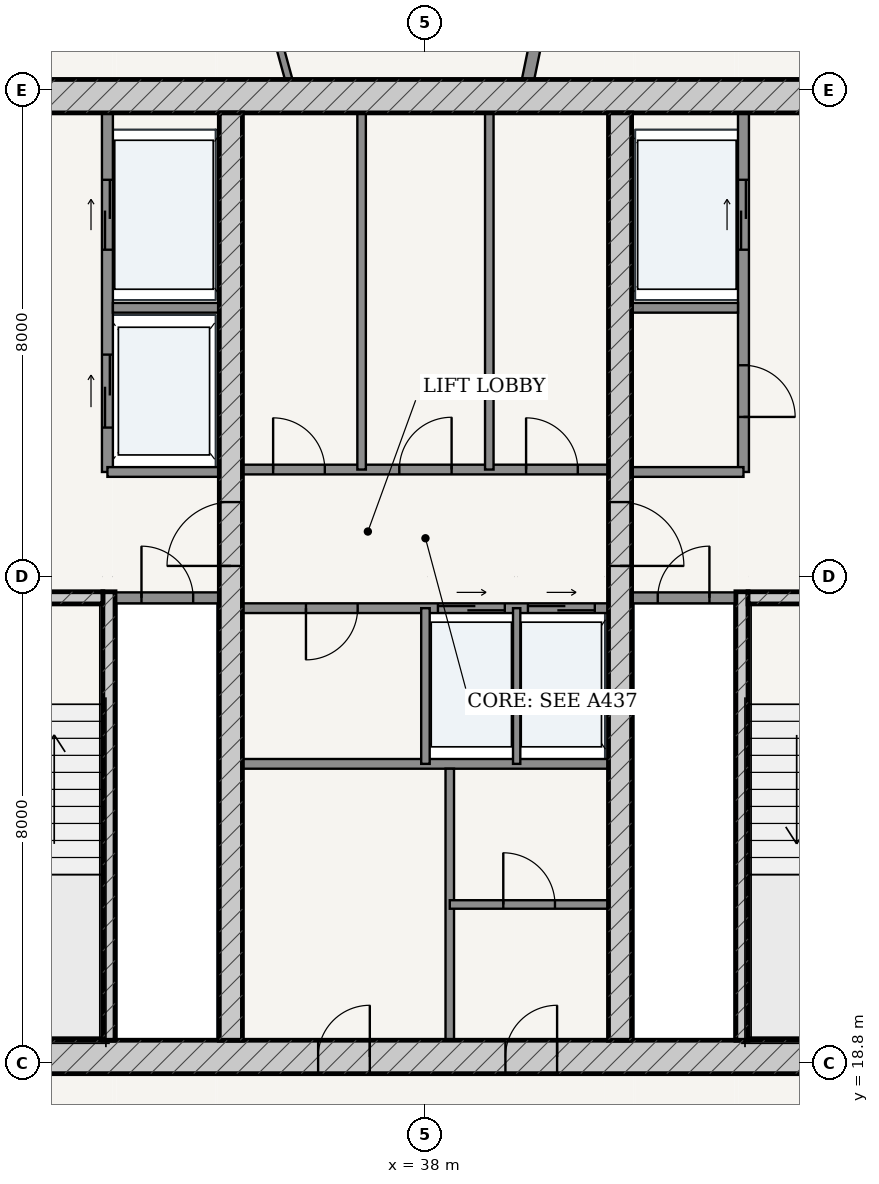
"""IFC4 building model, lengths in metres.
Left out: names, types, materials, properties, quantities, classifications, styles, units other than length and angle.
Written with IfcOpenShell. Run it as: python <this file> out.ifc"""

import sys

from ifc_helpers import new_model, si_unit, direction, frame, frame_2d, origin, place, context, subcontext, project, spatial, rectangle, extrude, source, transform, mapped, element, fill, save


model = new_model("IFC4")
c1 = context("Model", 3, precision=1e-05, world=origin(), true_north=direction((-0.2419218956, 0.970295726276)))
c2 = subcontext(c1, "Body", "Model", "MODEL_VIEW")
j1 = project(units=[si_unit("LENGTHUNIT", "METRE"), si_unit("PLANEANGLEUNIT", "RADIAN")], contexts=[c1])
p1 = place(None, origin())
s1 = spatial("IfcSite", under=j1, at=p1, CompositionType="ELEMENT")
p2 = place(p1, origin())
s2 = spatial("IfcBuilding", under=s1, at=p2, CompositionType="ELEMENT")
p3 = place(p2, frame((0.0, 0.0, 281.95)))
s3 = spatial("IfcBuildingStorey", under=s2, at=p3, CompositionType="ELEMENT", Elevation=281.95)
p4 = place(p3, frame((28.825, 18.9, 0.0), z_axis=(0.0, 0.0, 1.0), x_axis=(1.0, 0.0, 0.0)))
e1 = element("IfcWall", 1, at=p4, inside=s3, PredefinedType="SHEAR", context=c2, shape_type="SweptSolid", body=[
    extrude(rectangle(XDim=18.35, YDim=0.55, at=frame_2d((9.175, 0.0))), origin(), (0.0, 0.0, 1.0), 3.49),
])
p5 = place(p4, frame((7.41, 0.0, 0.0)))
e2 = element("IfcOpeningElement", 2, at=p5, cuts=e1, PredefinedType="OPENING", context=c2, shape_type="SweptSolid", body=[
    extrude(rectangle(XDim=0.85, YDim=2.1, at=frame_2d((0.425, 1.05))), frame((0.0, 0.285, 0.0), z_axis=(0.0, -1.0, 0.0), x_axis=(1.0, 0.0, 0.0)), (0.0, 0.0, 1.0), 0.57),
])
p6 = place(p4, frame((10.49, 0.0, 0.0)))
e3 = element("IfcOpeningElement", 3, at=p6, cuts=e1, PredefinedType="OPENING", context=c2, shape_type="SweptSolid", body=[
    extrude(rectangle(XDim=0.85, YDim=2.1, at=frame_2d((0.425, 1.05))), frame((0.0, 0.285, 0.0), z_axis=(0.0, -1.0, 0.0), x_axis=(1.0, 0.0, 0.0)), (0.0, 0.0, 1.0), 0.57),
])
p7 = place(p3, frame((28.825, 34.7, 0.0), z_axis=(0.0, 0.0, 1.0), x_axis=(1.0, 0.0, 0.0)))
e4 = element("IfcWall", 4, at=p7, inside=s3, PredefinedType="SHEAR", context=c2, shape_type="SweptSolid", body=[
    extrude(rectangle(XDim=18.35, YDim=0.55, at=frame_2d((9.175, 0.0))), origin(), (0.0, 0.0, 1.0), 3.49),
])
p8 = place(p3, frame((32.795, 19.175, 0.0), z_axis=(0.0, 0.0, 1.0), x_axis=(0.0, 1.0, 0.0)))
e5 = element("IfcWall", 5, at=p8, inside=s3, PredefinedType="SOLIDWALL", context=c2, shape_type="SweptSolid", body=[
    extrude(rectangle(XDim=7.375, YDim=0.2, at=frame_2d((3.688, 0.0))), origin(), (0.0, 0.0, 1.0), 3.49),
])
p9 = place(p3, frame((29.375, 26.45, 0.0), z_axis=(0.0, 0.0, 1.0), x_axis=(1.0, 0.0, 0.0)))
e6 = element("IfcWall", 6, at=p9, inside=s3, PredefinedType="SOLIDWALL", context=c2, shape_type="SweptSolid", body=[
    extrude(rectangle(XDim=3.32, YDim=0.2, at=frame_2d((1.66, 0.0))), origin(), (0.0, 0.0, 1.0), 3.49),
])
p10 = place(p9, frame((1.185, 0.0, 0.0)))
e7 = element("IfcOpeningElement", 7, at=p10, cuts=e6, PredefinedType="OPENING", context=c2, shape_type="SweptSolid", body=[
    extrude(rectangle(XDim=0.95, YDim=2.15, at=frame_2d((0.475, 1.075))), frame((0.0, 0.11, 0.0), z_axis=(0.0, -1.0, 0.0), x_axis=(1.0, 0.0, 0.0)), (0.0, 0.0, 1.0), 0.22),
])
p11 = place(p3, frame((43.205, 19.175, 0.0), z_axis=(0.0, 0.0, 1.0), x_axis=(0.0, 1.0, 0.0)))
e8 = element("IfcWall", 8, at=p11, inside=s3, PredefinedType="SOLIDWALL", context=c2, shape_type="SweptSolid", body=[
    extrude(rectangle(XDim=7.375, YDim=0.2, at=frame_2d((3.688, 0.0))), origin(), (0.0, 0.0, 1.0), 3.49),
])
p12 = place(p3, frame((43.305, 26.45, 0.0), z_axis=(0.0, 0.0, 1.0), x_axis=(1.0, 0.0, 0.0)))
e9 = element("IfcWall", 9, at=p12, inside=s3, PredefinedType="SOLIDWALL", context=c2, shape_type="SweptSolid", body=[
    extrude(rectangle(XDim=3.32, YDim=0.2, at=frame_2d((1.66, 0.0))), origin(), (0.0, 0.0, 1.0), 3.49),
])
p13 = place(p12, frame((1.185, 0.0, 0.0)))
e10 = element("IfcOpeningElement", 10, at=p13, cuts=e9, PredefinedType="OPENING", context=c2, shape_type="SweptSolid", body=[
    extrude(rectangle(XDim=0.95, YDim=2.15, at=frame_2d((0.475, 1.075))), frame((0.0, 0.11, 0.0), z_axis=(0.0, -1.0, 0.0), x_axis=(1.0, 0.0, 0.0)), (0.0, 0.0, 1.0), 0.22),
])
p14 = place(p3, frame((34.8, 19.175, 0.0), z_axis=(0.0, 0.0, 1.0), x_axis=(0.0, 1.0, 0.0)))
e11 = element("IfcWall", 11, at=p14, inside=s3, PredefinedType="SHEAR", context=c2, shape_type="SweptSolid", body=[
    extrude(rectangle(XDim=15.25, YDim=0.38, at=frame_2d((7.625, 0.0))), origin(), (0.0, 0.0, 1.0), 3.49),
])
p15 = place(p14, frame((7.8, 0.0, 0.0)))
e12 = element("IfcOpeningElement", 12, at=p15, cuts=e11, PredefinedType="OPENING", context=c2, shape_type="SweptSolid", body=[
    extrude(rectangle(XDim=1.05, YDim=2.15, at=frame_2d((0.525, 1.075))), frame((0.0, 0.2, 0.0), z_axis=(0.0, -1.0, 0.0), x_axis=(1.0, 0.0, 0.0)), (0.0, 0.0, 1.0), 0.4),
])
p16 = place(p3, frame((41.2, 19.175, 0.0), z_axis=(0.0, 0.0, 1.0), x_axis=(0.0, 1.0, 0.0)))
e13 = element("IfcWall", 13, at=p16, inside=s3, PredefinedType="SHEAR", context=c2, shape_type="SweptSolid", body=[
    extrude(rectangle(XDim=15.25, YDim=0.38, at=frame_2d((7.625, 0.0))), origin(), (0.0, 0.0, 1.0), 3.49),
])
p17 = place(p16, frame((7.8, 0.0, 0.0)))
e14 = element("IfcOpeningElement", 14, at=p17, cuts=e13, PredefinedType="OPENING", context=c2, shape_type="SweptSolid", body=[
    extrude(rectangle(XDim=1.05, YDim=2.15, at=frame_2d((0.525, 1.075))), frame((0.0, 0.2, 0.0), z_axis=(0.0, -1.0, 0.0), x_axis=(1.0, 0.0, 0.0)), (0.0, 0.0, 1.0), 0.4),
])
p18 = place(p3, frame((32.9, 26.45, 0.0), z_axis=(0.0, 0.0, 1.0), x_axis=(1.0, 0.0, 0.0)))
e15 = element("IfcWall", 15, at=p18, inside=s3, PredefinedType="PARTITIONING", context=c2, shape_type="SweptSolid", body=[
    extrude(rectangle(XDim=1.71, YDim=0.18, at=frame_2d((0.855, 0.0))), origin(), (0.0, 0.0, 1.0), 3.49),
])
p19 = place(p18, frame((0.43, 0.0, 0.0)))
e16 = element("IfcOpeningElement", 16, at=p19, cuts=e15, PredefinedType="OPENING", context=c2, shape_type="SweptSolid", body=[
    extrude(rectangle(XDim=0.85, YDim=2.1, at=frame_2d((0.425, 1.05))), frame((0.0, 0.1, 0.0), z_axis=(0.0, -1.0, 0.0), x_axis=(1.0, 0.0, 0.0)), (0.0, 0.0, 1.0), 0.2),
])
p20 = place(p3, frame((41.39, 26.45, 0.0), z_axis=(0.0, 0.0, 1.0), x_axis=(1.0, 0.0, 0.0)))
e17 = element("IfcWall", 17, at=p20, inside=s3, PredefinedType="PARTITIONING", context=c2, shape_type="SweptSolid", body=[
    extrude(rectangle(XDim=1.71, YDim=0.18, at=frame_2d((0.855, 0.0))), origin(), (0.0, 0.0, 1.0), 3.49),
])
p21 = place(p20, frame((0.43, 0.0, 0.0)))
e18 = element("IfcOpeningElement", 18, at=p21, cuts=e17, PredefinedType="OPENING", context=c2, shape_type="SweptSolid", body=[
    extrude(rectangle(XDim=0.85, YDim=2.1, at=frame_2d((0.425, 1.05))), frame((0.0, 0.1, 0.0), z_axis=(0.0, -1.0, 0.0), x_axis=(1.0, 0.0, 0.0)), (0.0, 0.0, 1.0), 0.2),
])
p22 = place(p3, frame((32.77, 28.52, 0.0), z_axis=(0.0, 0.0, 1.0), x_axis=(0.0, 1.0, 0.0)))
e19 = element("IfcWall", 19, at=p22, inside=s3, PredefinedType="PARTITIONING", context=c2, shape_type="SweptSolid", body=[
    extrude(rectangle(XDim=5.905, YDim=0.18, at=frame_2d((2.953, 0.0))), origin(), (0.0, 0.0, 1.0), 3.49),
])
p23 = place(p22, frame((3.655, 0.0, 0.0)))
e20 = element("IfcOpeningElement", 20, at=p23, cuts=e19, PredefinedType="OPENING", context=c2, shape_type="SweptSolid", body=[
    extrude(rectangle(XDim=1.15, YDim=2.2, at=frame_2d((0.575, 1.1))), frame((0.0, 0.1, 0.0), z_axis=(0.0, -1.0, 0.0), x_axis=(1.0, 0.0, 0.0)), (0.0, 0.0, 1.0), 0.2),
])
p24 = place(p22, frame((0.73, 0.0, 0.0)))
e21 = element("IfcOpeningElement", 21, at=p24, cuts=e19, PredefinedType="OPENING", context=c2, shape_type="SweptSolid", body=[
    extrude(rectangle(XDim=1.2, YDim=2.25, at=frame_2d((0.6, 1.125))), frame((0.0, 0.1, 0.0), z_axis=(0.0, -1.0, 0.0), x_axis=(1.0, 0.0, 0.0)), (0.0, 0.0, 1.0), 0.2),
])
p25 = place(p3, frame((32.86, 31.22, 0.0), z_axis=(0.0, 0.0, 1.0), x_axis=(1.0, 0.0, 0.0)))
e22 = element("IfcWall", 22, at=p25, inside=s3, PredefinedType="PARTITIONING", context=c2, shape_type="SweptSolid", body=[
    extrude(rectangle(XDim=1.75, YDim=0.16, at=frame_2d((0.875, 0.0))), origin(), (0.0, 0.0, 1.0), 3.49),
])
p26 = place(p3, frame((32.77, 28.52, 0.0), z_axis=(0.0, 0.0, 1.0), x_axis=(1.0, 0.0, 0.0)))
e23 = element("IfcWall", 23, at=p26, inside=s3, PredefinedType="PARTITIONING", context=c2, shape_type="SweptSolid", body=[
    extrude(rectangle(XDim=1.84, YDim=0.16, at=frame_2d((0.92, 0.0))), origin(), (0.0, 0.0, 1.0), 3.49),
])
p27 = place(p3, frame((43.23, 28.52, 0.0), z_axis=(0.0, 0.0, 1.0), x_axis=(0.0, 1.0, 0.0)))
e24 = element("IfcWall", 24, at=p27, inside=s3, PredefinedType="PARTITIONING", context=c2, shape_type="SweptSolid", body=[
    extrude(rectangle(XDim=5.905, YDim=0.18, at=frame_2d((2.953, 0.0))), origin(), (0.0, 0.0, 1.0), 3.49),
])
p28 = place(p27, frame((0.905, 0.0, 0.0)))
e25 = element("IfcOpeningElement", 25, at=p28, cuts=e24, PredefinedType="OPENING", context=c2, shape_type="SweptSolid", body=[
    extrude(rectangle(XDim=0.85, YDim=2.1, at=frame_2d((0.425, 1.05))), frame((0.0, 0.1, 0.0), z_axis=(0.0, -1.0, 0.0), x_axis=(1.0, 0.0, 0.0)), (0.0, 0.0, 1.0), 0.2),
])
p29 = place(p27, frame((3.655, 0.0, 0.0)))
e26 = element("IfcOpeningElement", 26, at=p29, cuts=e24, PredefinedType="OPENING", context=c2, shape_type="SweptSolid", body=[
    extrude(rectangle(XDim=1.15, YDim=2.2, at=frame_2d((0.575, 1.1))), frame((0.0, 0.1, 0.0), z_axis=(0.0, -1.0, 0.0), x_axis=(1.0, 0.0, 0.0)), (0.0, 0.0, 1.0), 0.2),
])
p30 = place(p3, frame((41.39, 31.22, 0.0), z_axis=(0.0, 0.0, 1.0), x_axis=(1.0, 0.0, 0.0)))
e27 = element("IfcWall", 27, at=p30, inside=s3, PredefinedType="PARTITIONING", context=c2, shape_type="SweptSolid", body=[
    extrude(rectangle(XDim=1.75, YDim=0.16, at=frame_2d((0.875, 0.0))), origin(), (0.0, 0.0, 1.0), 3.49),
])
p31 = place(p3, frame((41.39, 28.52, 0.0), z_axis=(0.0, 0.0, 1.0), x_axis=(1.0, 0.0, 0.0)))
e28 = element("IfcWall", 28, at=p31, inside=s3, PredefinedType="PARTITIONING", context=c2, shape_type="SweptSolid", body=[
    extrude(rectangle(XDim=1.84, YDim=0.16, at=frame_2d((0.92, 0.0))), origin(), (0.0, 0.0, 1.0), 3.49),
])
p32 = place(p3, frame((34.99, 28.56, 0.0), z_axis=(0.0, 0.0, 1.0), x_axis=(1.0, 0.0, 0.0)))
e29 = element("IfcWall", 29, at=p32, inside=s3, PredefinedType="PARTITIONING", context=c2, shape_type="SweptSolid", body=[
    extrude(rectangle(XDim=6.02, YDim=0.16, at=frame_2d((3.01, 0.0))), origin(), (0.0, 0.0, 1.0), 3.49),
])
p33 = place(p32, frame((0.505, 0.0, 0.0)))
e30 = element("IfcOpeningElement", 30, at=p33, cuts=e29, PredefinedType="OPENING", context=c2, shape_type="SweptSolid", body=[
    extrude(rectangle(XDim=0.85, YDim=2.1, at=frame_2d((0.425, 1.05))), frame((0.0, 0.09, 0.0), z_axis=(0.0, -1.0, 0.0), x_axis=(1.0, 0.0, 0.0)), (0.0, 0.0, 1.0), 0.18),
])
p34 = place(p32, frame((2.58, 0.0, 0.0)))
e31 = element("IfcOpeningElement", 31, at=p34, cuts=e29, PredefinedType="OPENING", context=c2, shape_type="SweptSolid", body=[
    extrude(rectangle(XDim=0.86, YDim=2.1, at=frame_2d((0.43, 1.05))), frame((0.0, 0.09, 0.0), z_axis=(0.0, -1.0, 0.0), x_axis=(1.0, 0.0, 0.0)), (0.0, 0.0, 1.0), 0.18),
])
p35 = place(p32, frame((4.665, 0.0, 0.0)))
e32 = element("IfcOpeningElement", 32, at=p35, cuts=e29, PredefinedType="OPENING", context=c2, shape_type="SweptSolid", body=[
    extrude(rectangle(XDim=0.85, YDim=2.1, at=frame_2d((0.425, 1.05))), frame((0.0, 0.09, 0.0), z_axis=(0.0, -1.0, 0.0), x_axis=(1.0, 0.0, 0.0)), (0.0, 0.0, 1.0), 0.18),
])
for number, where, z_axis, x_axis in (
    (33, (36.95, 28.56, 0.0), (0.0, 0.0, 1.0), (0.0, 1.0, 0.0)),
    (34, (39.05, 28.56, 0.0), (0.0, 0.0, 1.0), (0.0, 1.0, 0.0)),
):
    element("IfcWall", number, at=place(p3, frame(where, z_axis=z_axis, x_axis=x_axis)), inside=s3, PredefinedType="PARTITIONING", context=c2, shape_type="SweptSolid", body=[
        extrude(rectangle(XDim=5.865, YDim=0.14, at=frame_2d((2.933, 0.0))), origin(), (0.0, 0.0, 1.0), 3.49),
    ])
p36 = place(p3, frame((34.99, 26.28, 0.0), z_axis=(0.0, 0.0, 1.0), x_axis=(1.0, 0.0, 0.0)))
e35 = element("IfcWall", 35, at=p36, inside=s3, PredefinedType="PARTITIONING", context=c2, shape_type="SweptSolid", body=[
    extrude(rectangle(XDim=6.02, YDim=0.16, at=frame_2d((3.01, 0.0))), origin(), (0.0, 0.0, 1.0), 3.49),
])
p37 = place(p36, frame((1.045, 0.0, 0.0)))
e36 = element("IfcOpeningElement", 36, at=p37, cuts=e35, PredefinedType="OPENING", context=c2, shape_type="SweptSolid", body=[
    extrude(rectangle(XDim=0.85, YDim=2.1, at=frame_2d((0.425, 1.05))), frame((0.0, 0.09, 0.0), z_axis=(0.0, -1.0, 0.0), x_axis=(1.0, 0.0, 0.0)), (0.0, 0.0, 1.0), 0.18),
])
p38 = place(p36, frame((3.215, 0.0, 0.0)))
e37 = element("IfcOpeningElement", 37, at=p38, cuts=e35, PredefinedType="OPENING", context=c2, shape_type="SweptSolid", body=[
    extrude(rectangle(XDim=1.1, YDim=2.2, at=frame_2d((0.55, 1.1))), frame((0.0, 0.09, 0.0), z_axis=(0.0, -1.0, 0.0), x_axis=(1.0, 0.0, 0.0)), (0.0, 0.0, 1.0), 0.18),
])
p39 = place(p36, frame((4.695, 0.0, 0.0)))
e38 = element("IfcOpeningElement", 38, at=p39, cuts=e35, PredefinedType="OPENING", context=c2, shape_type="SweptSolid", body=[
    extrude(rectangle(XDim=1.1, YDim=2.2, at=frame_2d((0.55, 1.1))), frame((0.0, 0.09, 0.0), z_axis=(0.0, -1.0, 0.0), x_axis=(1.0, 0.0, 0.0)), (0.0, 0.0, 1.0), 0.18),
])
p40 = place(p3, frame((34.99, 23.72, 0.0), z_axis=(0.0, 0.0, 1.0), x_axis=(1.0, 0.0, 0.0)))
e39 = element("IfcWall", 39, at=p40, inside=s3, PredefinedType="PARTITIONING", context=c2, shape_type="SweptSolid", body=[
    extrude(rectangle(XDim=6.02, YDim=0.16, at=frame_2d((3.01, 0.0))), origin(), (0.0, 0.0, 1.0), 3.49),
])
p41 = place(p3, frame((38.0, 23.72, 0.0), z_axis=(0.0, 0.0, 1.0), x_axis=(0.0, 1.0, 0.0)))
e40 = element("IfcWall", 40, at=p41, inside=s3, PredefinedType="PARTITIONING", context=c2, shape_type="SweptSolid", body=[
    extrude(rectangle(XDim=2.56, YDim=0.14, at=frame_2d((1.28, 0.0))), origin(), (0.0, 0.0, 1.0), 3.49),
])
p42 = place(p3, frame((39.5, 23.72, 0.0), z_axis=(0.0, 0.0, 1.0), x_axis=(0.0, 1.0, 0.0)))
e41 = element("IfcWall", 41, at=p42, inside=s3, PredefinedType="PARTITIONING", context=c2, shape_type="SweptSolid", body=[
    extrude(rectangle(XDim=2.56, YDim=0.12, at=frame_2d((1.28, 0.0))), origin(), (0.0, 0.0, 1.0), 3.49),
])
p43 = place(p3, frame((38.4, 19.175, 0.0), z_axis=(0.0, 0.0, 1.0), x_axis=(0.0, 1.0, 0.0)))
e42 = element("IfcWall", 42, at=p43, inside=s3, PredefinedType="PARTITIONING", context=c2, shape_type="SweptSolid", body=[
    extrude(rectangle(XDim=4.465, YDim=0.14, at=frame_2d((2.232, 0.0))), origin(), (0.0, 0.0, 1.0), 3.49),
])
p44 = place(p3, frame((38.4, 21.407, 0.0), z_axis=(0.0, 0.0, 1.0), x_axis=(1.0, 0.0, 0.0)))
e43 = element("IfcWall", 43, at=p44, inside=s3, PredefinedType="PARTITIONING", context=c2, shape_type="SweptSolid", body=[
    extrude(rectangle(XDim=2.61, YDim=0.14, at=frame_2d((1.305, 0.0))), origin(), (0.0, 0.0, 1.0), 3.49),
])
p45 = place(p44, frame((0.88, 0.0, 0.0)))
e44 = element("IfcOpeningElement", 44, at=p45, cuts=e43, PredefinedType="OPENING", context=c2, shape_type="SweptSolid", body=[
    extrude(rectangle(XDim=0.85, YDim=2.1, at=frame_2d((0.425, 1.05))), frame((0.0, 0.08, 0.0), z_axis=(0.0, -1.0, 0.0), x_axis=(1.0, 0.0, 0.0)), (0.0, 0.0, 1.0), 0.16),
])
p46 = place(p3, frame((39.688, 34.977, 0.0), z_axis=(0.0, 0.0, 1.0), x_axis=(0.202091890364, 0.979366564596, 0.0)))
e45 = element("IfcWall", 45, at=p46, inside=s3, PredefinedType="PARTITIONING", context=c2, shape_type="SweptSolid", body=[
    extrude(rectangle(XDim=10.278, YDim=0.2, at=frame_2d((5.139, 0.0))), origin(), (0.0, 0.0, 1.0), 2.575),
])
p47 = place(p3, frame((35.751, 34.977, 0.0), z_axis=(0.0, 0.0, 1.0), x_axis=(-0.26521778697, 0.964188532122, 0.0)))
e46 = element("IfcWall", 46, at=p47, inside=s3, PredefinedType="PARTITIONING", context=c2, shape_type="SweptSolid", body=[
    extrude(rectangle(XDim=2.684, YDim=0.12, at=frame_2d((1.342, 0.0))), origin(), (0.0, 0.0, 1.0), 2.575),
])
m1 = source(origin(), c2, "Body", "SweptSolid", [
    extrude(rectangle(XDim=1.05, YDim=2.15, at=frame_2d((0.525, 1.075))), frame((0.0, 0.025, 0.0), z_axis=(0.0, -1.0, 0.0), x_axis=(1.0, 0.0, 0.0)), (0.0, 0.0, 1.0), 0.05),
])
p48 = place(p15, origin())
e47 = element("IfcDoor", 47, at=p48, inside=s3, OperationType="SINGLE_SWING_LEFT", PredefinedType="DOOR", context=c2, shape_type="MappedRepresentation", body=[
    mapped(m1, transform((0.0, 0.0, 0.0), scale=1.0)),
])
fill(e12, e47)
p49 = place(p17, frame((1.05, 0.0, 0.0), z_axis=(0.0, 0.0, 1.0), x_axis=(-1.0, 0.0, 0.0)))
e48 = element("IfcDoor", 48, at=p49, inside=s3, OperationType="SINGLE_SWING_RIGHT", PredefinedType="DOOR", context=c2, shape_type="MappedRepresentation", body=[
    mapped(m1, transform((0.0, 0.0, 0.0), scale=1.0)),
])
fill(e14, e48)
m2 = source(origin(), c2, "Body", "SweptSolid", [
    extrude(rectangle(XDim=0.85, YDim=2.1, at=frame_2d((0.425, 1.05))), frame((0.0, 0.025, 0.0), z_axis=(0.0, -1.0, 0.0), x_axis=(1.0, 0.0, 0.0)), (0.0, 0.0, 1.0), 0.05),
])
p50 = place(p19, origin())
e49 = element("IfcDoor", 49, at=p50, inside=s3, OperationType="SINGLE_SWING_LEFT", PredefinedType="DOOR", context=c2, shape_type="MappedRepresentation", body=[
    mapped(m2, transform((0.0, 0.0, 0.0), scale=1.0)),
])
fill(e16, e49)
p51 = place(p21, origin())
e50 = element("IfcDoor", 50, at=p51, inside=s3, OperationType="SINGLE_SWING_RIGHT", PredefinedType="DOOR", context=c2, shape_type="MappedRepresentation", body=[
    mapped(m2, transform((0.0, 0.0, 0.0), scale=1.0)),
])
fill(e18, e50)
p52 = place(p28, frame((0.85, 0.0, 0.0), z_axis=(0.0, 0.0, 1.0), x_axis=(-1.0, 0.0, 0.0)))
e51 = element("IfcDoor", 51, at=p52, inside=s3, OperationType="SINGLE_SWING_RIGHT", PredefinedType="DOOR", context=c2, shape_type="MappedRepresentation", body=[
    mapped(m2, transform((0.0, 0.0, 0.0), scale=1.0)),
])
fill(e25, e51)
p53 = place(p33, origin())
e52 = element("IfcDoor", 52, at=p53, inside=s3, OperationType="SINGLE_SWING_LEFT", PredefinedType="DOOR", context=c2, shape_type="MappedRepresentation", body=[
    mapped(m2, transform((0.0, 0.0, 0.0), scale=1.0)),
])
fill(e30, e52)
m3 = source(origin(), c2, "Body", "SweptSolid", [
    extrude(rectangle(XDim=0.86, YDim=2.1, at=frame_2d((0.43, 1.05))), frame((0.0, 0.025, 0.0), z_axis=(0.0, -1.0, 0.0), x_axis=(1.0, 0.0, 0.0)), (0.0, 0.0, 1.0), 0.05),
])
p54 = place(p34, origin())
e53 = element("IfcDoor", 53, at=p54, inside=s3, OperationType="SINGLE_SWING_RIGHT", PredefinedType="DOOR", context=c2, shape_type="MappedRepresentation", body=[
    mapped(m3, transform((0.0, 0.0, 0.0), scale=1.0)),
])
fill(e31, e53)
p55 = place(p35, origin())
e54 = element("IfcDoor", 54, at=p55, inside=s3, OperationType="SINGLE_SWING_LEFT", PredefinedType="DOOR", context=c2, shape_type="MappedRepresentation", body=[
    mapped(m2, transform((0.0, 0.0, 0.0), scale=1.0)),
])
fill(e32, e54)
p56 = place(p37, frame((0.85, 0.0, 0.0), z_axis=(0.0, 0.0, 1.0), x_axis=(-1.0, 0.0, 0.0)))
e55 = element("IfcDoor", 55, at=p56, inside=s3, OperationType="SINGLE_SWING_RIGHT", PredefinedType="DOOR", context=c2, shape_type="MappedRepresentation", body=[
    mapped(m2, transform((0.0, 0.0, 0.0), scale=1.0)),
])
fill(e36, e55)
p57 = place(p5, origin())
e56 = element("IfcDoor", 56, at=p57, inside=s3, OperationType="SINGLE_SWING_RIGHT", PredefinedType="DOOR", context=c2, shape_type="MappedRepresentation", body=[
    mapped(m2, transform((0.0, 0.0, 0.0), scale=1.0)),
])
fill(e2, e56)
p58 = place(p6, origin())
e57 = element("IfcDoor", 57, at=p58, inside=s3, OperationType="SINGLE_SWING_RIGHT", PredefinedType="DOOR", context=c2, shape_type="MappedRepresentation", body=[
    mapped(m2, transform((0.0, 0.0, 0.0), scale=1.0)),
])
fill(e3, e57)
p59 = place(p45, origin())
e58 = element("IfcDoor", 58, at=p59, inside=s3, OperationType="SINGLE_SWING_LEFT", PredefinedType="DOOR", context=c2, shape_type="MappedRepresentation", body=[
    mapped(m2, transform((0.0, 0.0, 0.0), scale=1.0)),
])
fill(e44, e58)
m4 = source(origin(), c2, "Body", "SweptSolid", [
    extrude(rectangle(XDim=1.15, YDim=2.2, at=frame_2d((0.575, 1.1))), frame((0.0, 0.025, 0.0), z_axis=(0.0, -1.0, 0.0), x_axis=(1.0, 0.0, 0.0)), (0.0, 0.0, 1.0), 0.05),
])
p60 = place(p23, origin())
e59 = element("IfcDoor", 59, at=p60, inside=s3, OperationType="DOUBLE_DOOR_SLIDING", PredefinedType="DOOR", context=c2, shape_type="MappedRepresentation", body=[
    mapped(m4, transform((0.0, 0.0, 0.0), scale=1.0)),
])
fill(e20, e59)
p61 = place(p29, origin())
e60 = element("IfcDoor", 60, at=p61, inside=s3, OperationType="DOUBLE_DOOR_SLIDING", PredefinedType="DOOR", context=c2, shape_type="MappedRepresentation", body=[
    mapped(m4, transform((0.0, 0.0, 0.0), scale=1.0)),
])
fill(e26, e60)
m5 = source(origin(), c2, "Body", "SweptSolid", [
    extrude(rectangle(XDim=1.2, YDim=2.25, at=frame_2d((0.6, 1.125))), frame((0.0, 0.025, 0.0), z_axis=(0.0, -1.0, 0.0), x_axis=(1.0, 0.0, 0.0)), (0.0, 0.0, 1.0), 0.05),
])
p62 = place(p24, origin())
e61 = element("IfcDoor", 61, at=p62, inside=s3, OperationType="DOUBLE_DOOR_SLIDING", PredefinedType="DOOR", context=c2, shape_type="MappedRepresentation", body=[
    mapped(m5, transform((0.0, 0.0, 0.0), scale=1.0)),
])
fill(e21, e61)
m6 = source(origin(), c2, "Body", "SweptSolid", [
    extrude(rectangle(XDim=1.1, YDim=2.2, at=frame_2d((0.55, 1.1))), frame((0.0, 0.025, 0.0), z_axis=(0.0, -1.0, 0.0), x_axis=(1.0, 0.0, 0.0)), (0.0, 0.0, 1.0), 0.05),
])
p63 = place(p38, origin())
e62 = element("IfcDoor", 62, at=p63, inside=s3, OperationType="DOUBLE_DOOR_SLIDING", PredefinedType="DOOR", context=c2, shape_type="MappedRepresentation", body=[
    mapped(m6, transform((0.0, 0.0, 0.0), scale=1.0)),
])
fill(e37, e62)
p64 = place(p39, origin())
e63 = element("IfcDoor", 63, at=p64, inside=s3, OperationType="DOUBLE_DOOR_SLIDING", PredefinedType="DOOR", context=c2, shape_type="MappedRepresentation", body=[
    mapped(m6, transform((0.0, 0.0, 0.0), scale=1.0)),
])
fill(e38, e63)
save(model, sys.argv[1])
